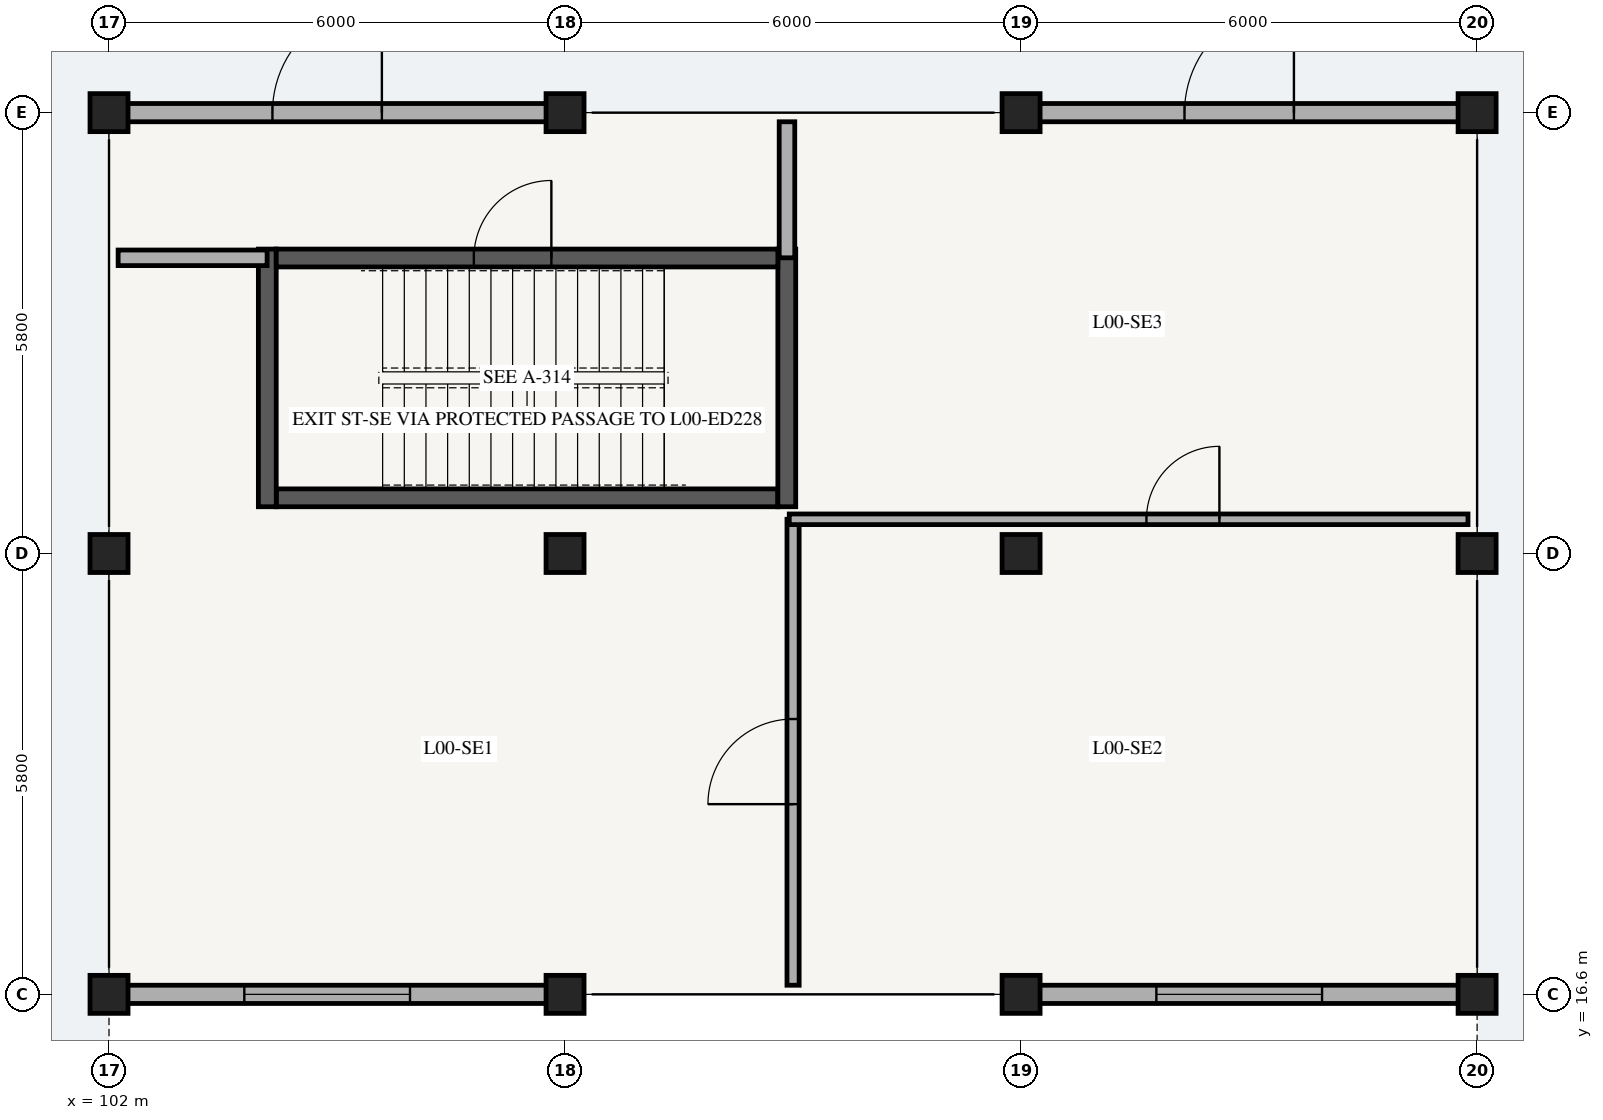
"""IFC4 building model, lengths in metres.
Left out: names, types, materials, properties, quantities, classifications, styles, units other than length and angle.
Written with IfcOpenShell. Run it as: python <this file> out.ifc"""

import sys

from ifc_helpers import new_model, si_unit, direction, frame, frame_2d, origin, origin_2d, place, context, subcontext, project, spatial, rectangle, extrude, element, fill, save


model = new_model("IFC4")
c1 = context("Model", 3, precision=1e-05, world=origin(), true_north=direction((0.0, 1.0)))
c2 = subcontext(c1, "Body", "Model", "MODEL_VIEW")
j1 = project(units=[si_unit("LENGTHUNIT", "METRE"), si_unit("PLANEANGLEUNIT", "RADIAN")], contexts=[c1])
p1 = place(None, origin())
s1 = spatial("IfcSite", under=j1, at=p1, CompositionType="ELEMENT")
p2 = place(p1, origin())
s2 = spatial("IfcBuilding", under=s1, at=p2, CompositionType="ELEMENT")
p3 = place(p2, origin())
s3 = spatial("IfcBuildingStorey", under=s2, at=p3, CompositionType="ELEMENT", Elevation=0.0)
p4 = place(p3, frame((104.2, 23.133, 0.0), z_axis=(0.0, 0.0, 1.0), x_axis=(1.0, 0.0, 0.0)))
e1 = element("IfcWall", 1, at=p4, inside=s3, PredefinedType="SHEAR", context=c2, shape_type="SweptSolid", body=[
    extrude(rectangle(XDim=6.6, YDim=0.235, at=frame_2d((3.3, 0.0))), origin(), (0.0, 0.0, 1.0), 4.49),
])
for number, where, z_axis, x_axis in (
    (2, (110.917, 23.015, 0.0), (0.0, 0.0, 1.0), (0.0, 1.0, 0.0)),
    (3, (104.083, 23.015, 0.0), (0.0, 0.0, 1.0), (0.0, 1.0, 0.0)),
):
    element("IfcWall", number, at=place(p3, frame(where, z_axis=z_axis, x_axis=x_axis)), inside=s3, PredefinedType="SHEAR", context=c2, shape_type="SweptSolid", body=[
        extrude(rectangle(XDim=3.39, YDim=0.235, at=frame_2d((1.695, 0.0))), origin(), (0.0, 0.0, 1.0), 4.49),
    ])
p5 = place(p3, frame((104.2, 26.288, 0.0), z_axis=(0.0, 0.0, 1.0), x_axis=(1.0, 0.0, 0.0)))
e4 = element("IfcWall", 4, at=p5, inside=s3, PredefinedType="SHEAR", context=c2, shape_type="SweptSolid", body=[
    extrude(rectangle(XDim=6.6, YDim=0.235, at=frame_2d((3.3, 0.0))), origin(), (0.0, 0.0, 1.0), 4.49),
])
p6 = place(p5, frame((2.6, 0.0, 0.0)))
e5 = element("IfcOpeningElement", 5, at=p6, cuts=e4, PredefinedType="OPENING", context=c2, shape_type="SweptSolid", body=[
    extrude(rectangle(XDim=1.02, YDim=2.14, at=frame_2d((0.51, 1.07))), frame((0.0, 0.127, 0.0), z_axis=(0.0, -1.0, 0.0), x_axis=(1.0, 0.0, 0.0)), (0.0, 0.0, 1.0), 0.255),
])
for number, where, z_axis, x_axis in (
    (6, (102.0, 16.6, 0.0), (0.0, 0.0, 1.0), (1.0, 0.0, 0.0)),
    (7, (102.0, 22.4, 0.0), (0.0, 0.0, 1.0), (1.0, 0.0, 0.0)),
    (8, (102.0, 28.2, 0.0), (0.0, 0.0, 1.0), (1.0, 0.0, 0.0)),
    (9, (108.0, 16.6, 0.0), (0.0, 0.0, 1.0), (1.0, 0.0, 0.0)),
    (10, (108.0, 22.4, 0.0), (0.0, 0.0, 1.0), (1.0, 0.0, 0.0)),
    (11, (108.0, 28.2, 0.0), (0.0, 0.0, 1.0), (1.0, 0.0, 0.0)),
    (12, (114.0, 16.6, 0.0), (0.0, 0.0, 1.0), (1.0, 0.0, 0.0)),
    (13, (114.0, 22.4, 0.0), (0.0, 0.0, 1.0), (1.0, 0.0, 0.0)),
    (14, (114.0, 28.2, 0.0), (0.0, 0.0, 1.0), (1.0, 0.0, 0.0)),
    (15, (120.0, 16.6, 0.0), (0.0, 0.0, 1.0), (1.0, 0.0, 0.0)),
    (16, (120.0, 22.4, 0.0), (0.0, 0.0, 1.0), (1.0, 0.0, 0.0)),
    (17, (120.0, 28.2, 0.0), (0.0, 0.0, 1.0), (1.0, 0.0, 0.0)),
):
    element("IfcColumn", number, at=place(p3, frame(where, z_axis=z_axis, x_axis=x_axis)), inside=s3, PredefinedType="COLUMN", context=c2, shape_type="SweptSolid", body=[
        extrude(rectangle(XDim=0.5, YDim=0.5, at=origin_2d()), origin(), (0.0, 0.0, 1.0), 4.49),
    ])
p7 = place(p3, frame((102.22, 16.6, 0.0), z_axis=(0.0, 0.0, 1.0), x_axis=(1.0, 0.0, 0.0)))
e18 = element("IfcWall", 18, at=p7, inside=s3, PredefinedType="SOLIDWALL", context=c2, shape_type="SweptSolid", body=[
    extrude(rectangle(XDim=5.56, YDim=0.24, at=frame_2d((2.78, 0.0))), origin(), (0.0, 0.0, 1.0), 3.75),
])
p8 = place(p7, frame((1.56, 0.0, 0.55)))
e19 = element("IfcOpeningElement", 19, at=p8, cuts=e18, PredefinedType="OPENING", context=c2, shape_type="SweptSolid", body=[
    extrude(rectangle(XDim=2.18, YDim=2.05, at=frame_2d((1.09, 1.025))), frame((0.0, 0.13, 0.0), z_axis=(0.0, -1.0, 0.0), x_axis=(1.0, 0.0, 0.0)), (0.0, 0.0, 1.0), 0.26),
])
p9 = place(p3, frame((114.22, 16.6, 0.0), z_axis=(0.0, 0.0, 1.0), x_axis=(1.0, 0.0, 0.0)))
e20 = element("IfcWall", 20, at=p9, inside=s3, PredefinedType="SOLIDWALL", context=c2, shape_type="SweptSolid", body=[
    extrude(rectangle(XDim=5.56, YDim=0.24, at=frame_2d((2.78, 0.0))), origin(), (0.0, 0.0, 1.0), 3.75),
])
p10 = place(p9, frame((1.56, 0.0, 0.55)))
e21 = element("IfcOpeningElement", 21, at=p10, cuts=e20, PredefinedType="OPENING", context=c2, shape_type="SweptSolid", body=[
    extrude(rectangle(XDim=2.18, YDim=2.05, at=frame_2d((1.09, 1.025))), frame((0.0, 0.13, 0.0), z_axis=(0.0, -1.0, 0.0), x_axis=(1.0, 0.0, 0.0)), (0.0, 0.0, 1.0), 0.26),
])
p11 = place(p3, frame((102.22, 28.2, 0.0), z_axis=(0.0, 0.0, 1.0), x_axis=(1.0, 0.0, 0.0)))
e22 = element("IfcWall", 22, at=p11, inside=s3, PredefinedType="SOLIDWALL", context=c2, shape_type="SweptSolid", body=[
    extrude(rectangle(XDim=5.56, YDim=0.24, at=frame_2d((2.78, 0.0))), origin(), (0.0, 0.0, 1.0), 3.75),
])
p12 = place(p11, frame((1.93, 0.0, 0.0)))
e23 = element("IfcOpeningElement", 23, at=p12, cuts=e22, PredefinedType="OPENING", context=c2, shape_type="SweptSolid", body=[
    extrude(rectangle(XDim=1.44, YDim=2.18, at=frame_2d((0.72, 1.09))), frame((0.0, 0.13, 0.0), z_axis=(0.0, -1.0, 0.0), x_axis=(1.0, 0.0, 0.0)), (0.0, 0.0, 1.0), 0.26),
])
p13 = place(p3, frame((114.22, 28.2, 0.0), z_axis=(0.0, 0.0, 1.0), x_axis=(1.0, 0.0, 0.0)))
e24 = element("IfcWall", 24, at=p13, inside=s3, PredefinedType="SOLIDWALL", context=c2, shape_type="SweptSolid", body=[
    extrude(rectangle(XDim=5.56, YDim=0.24, at=frame_2d((2.78, 0.0))), origin(), (0.0, 0.0, 1.0), 3.75),
])
p14 = place(p13, frame((1.93, 0.0, 0.0)))
e25 = element("IfcOpeningElement", 25, at=p14, cuts=e24, PredefinedType="OPENING", context=c2, shape_type="SweptSolid", body=[
    extrude(rectangle(XDim=1.44, YDim=2.18, at=frame_2d((0.72, 1.09))), frame((0.0, 0.13, 0.0), z_axis=(0.0, -1.0, 0.0), x_axis=(1.0, 0.0, 0.0)), (0.0, 0.0, 1.0), 0.26),
])
p15 = place(p3, frame((102.12, 26.29, 0.0), z_axis=(0.0, 0.0, 1.0), x_axis=(1.0, 0.0, 0.0)))
e26 = element("IfcWall", 26, at=p15, inside=s3, PredefinedType="PARTITIONING", context=c2, shape_type="SweptSolid", body=[
    extrude(rectangle(XDim=1.96, YDim=0.205, at=frame_2d((0.98, 0.0))), origin(), (0.0, 0.0, 1.0), 3.52),
])
p16 = place(p3, frame((110.92, 26.29, 0.0), z_axis=(0.0, 0.0, 1.0), x_axis=(0.0, 1.0, 0.0)))
e27 = element("IfcWall", 27, at=p16, inside=s3, PredefinedType="PARTITIONING", context=c2, shape_type="SweptSolid", body=[
    extrude(rectangle(XDim=1.79, YDim=0.205, at=frame_2d((0.895, 0.0))), origin(), (0.0, 0.0, 1.0), 3.52),
])
p17 = place(p3, frame((111.0, 16.72, 0.0), z_axis=(0.0, 0.0, 1.0), x_axis=(0.0, 1.0, 0.0)))
e28 = element("IfcWall", 28, at=p17, inside=s3, PredefinedType="PARTITIONING", context=c2, shape_type="SweptSolid", body=[
    extrude(rectangle(XDim=6.13, YDim=0.16, at=frame_2d((3.065, 0.0))), origin(), (0.0, 0.0, 1.0), 3.52),
])
p18 = place(p17, frame((2.382, 0.0, 0.0)))
e29 = element("IfcOpeningElement", 29, at=p18, cuts=e28, PredefinedType="OPENING", context=c2, shape_type="SweptSolid", body=[
    extrude(rectangle(XDim=1.12, YDim=2.12, at=frame_2d((0.56, 1.06))), frame((0.0, 0.09, 0.0), z_axis=(0.0, -1.0, 0.0), x_axis=(1.0, 0.0, 0.0)), (0.0, 0.0, 1.0), 0.18),
])
p19 = place(p3, frame((110.95, 22.85, 0.0), z_axis=(0.0, 0.0, 1.0), x_axis=(1.0, 0.0, 0.0)))
e30 = element("IfcWall", 30, at=p19, inside=s3, PredefinedType="PLUMBINGWALL", context=c2, shape_type="SweptSolid", body=[
    extrude(rectangle(XDim=8.93, YDim=0.14, at=frame_2d((4.465, 0.0))), origin(), (0.0, 0.0, 1.0), 3.52),
])
p20 = place(p19, frame((4.699, 0.0, 0.0)))
e31 = element("IfcOpeningElement", 31, at=p20, cuts=e30, PredefinedType="OPENING", context=c2, shape_type="SweptSolid", body=[
    extrude(rectangle(XDim=0.96, YDim=2.1, at=frame_2d((0.48, 1.05))), frame((0.0, 0.08, 0.0), z_axis=(0.0, -1.0, 0.0), x_axis=(1.0, 0.0, 0.0)), (0.0, 0.0, 1.0), 0.16),
])
p21 = place(p8, origin())
e32 = element("IfcWindow", 32, at=p21, inside=s3, PartitioningType="SINGLE_PANEL", PredefinedType="WINDOW", context=c2, shape_type="SweptSolid", body=[
    extrude(rectangle(XDim=2.18, YDim=2.05, at=frame_2d((1.09, 1.025))), frame((0.0, 0.03, 0.0), z_axis=(0.0, -1.0, 0.0), x_axis=(1.0, 0.0, 0.0)), (0.0, 0.0, 1.0), 0.06),
])
fill(e19, e32)
p22 = place(p10, origin())
e33 = element("IfcWindow", 33, at=p22, inside=s3, PartitioningType="SINGLE_PANEL", PredefinedType="WINDOW", context=c2, shape_type="SweptSolid", body=[
    extrude(rectangle(XDim=2.18, YDim=2.05, at=frame_2d((1.09, 1.025))), frame((0.0, 0.03, 0.0), z_axis=(0.0, -1.0, 0.0), x_axis=(1.0, 0.0, 0.0)), (0.0, 0.0, 1.0), 0.06),
])
fill(e21, e33)
p23 = place(p12, origin())
e34 = element("IfcDoor", 34, at=p23, inside=s3, OperationType="DOUBLE_DOOR_SINGLE_SWING", PredefinedType="DOOR", context=c2, shape_type="SweptSolid", body=[
    extrude(rectangle(XDim=1.44, YDim=2.18, at=frame_2d((0.72, 1.09))), frame((0.0, 0.025, 0.0), z_axis=(0.0, -1.0, 0.0), x_axis=(1.0, 0.0, 0.0)), (0.0, 0.0, 1.0), 0.05),
])
fill(e23, e34)
p24 = place(p14, origin())
e35 = element("IfcDoor", 35, at=p24, inside=s3, OperationType="DOUBLE_DOOR_SINGLE_SWING", PredefinedType="DOOR", context=c2, shape_type="SweptSolid", body=[
    extrude(rectangle(XDim=1.44, YDim=2.18, at=frame_2d((0.72, 1.09))), frame((0.0, 0.025, 0.0), z_axis=(0.0, -1.0, 0.0), x_axis=(1.0, 0.0, 0.0)), (0.0, 0.0, 1.0), 0.05),
])
fill(e25, e35)
p25 = place(p6, origin())
e36 = element("IfcDoor", 36, at=p25, inside=s3, OperationType="SINGLE_SWING_RIGHT", PredefinedType="DOOR", context=c2, shape_type="SweptSolid", body=[
    extrude(rectangle(XDim=1.02, YDim=2.14, at=frame_2d((0.51, 1.07))), frame((0.0, 0.025, 0.0), z_axis=(0.0, -1.0, 0.0), x_axis=(1.0, 0.0, 0.0)), (0.0, 0.0, 1.0), 0.05),
])
fill(e5, e36)
p26 = place(p18, origin())
e37 = element("IfcDoor", 37, at=p26, inside=s3, OperationType="SINGLE_SWING_LEFT", PredefinedType="DOOR", context=c2, shape_type="SweptSolid", body=[
    extrude(rectangle(XDim=1.12, YDim=2.12, at=frame_2d((0.56, 1.06))), frame((0.0, 0.025, 0.0), z_axis=(0.0, -1.0, 0.0), x_axis=(1.0, 0.0, 0.0)), (0.0, 0.0, 1.0), 0.05),
])
fill(e29, e37)
p27 = place(p20, origin())
e38 = element("IfcDoor", 38, at=p27, inside=s3, OperationType="SINGLE_SWING_RIGHT", PredefinedType="DOOR", context=c2, shape_type="SweptSolid", body=[
    extrude(rectangle(XDim=0.96, YDim=2.1, at=frame_2d((0.48, 1.05))), frame((0.0, 0.025, 0.0), z_axis=(0.0, -1.0, 0.0), x_axis=(1.0, 0.0, 0.0)), (0.0, 0.0, 1.0), 0.05),
])
fill(e31, e38)
save(model, sys.argv[1])
